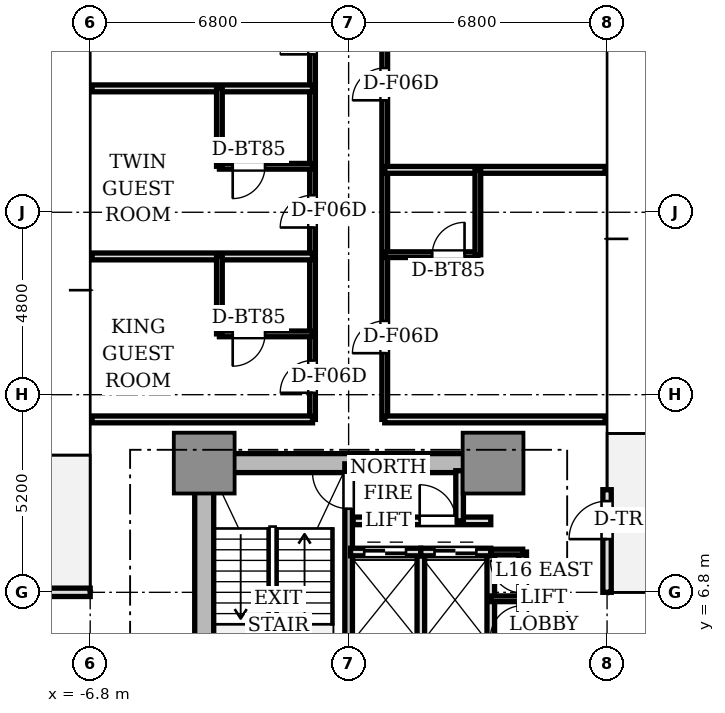
"""IFC4 building model, lengths in metres.
Left out: names, types, materials, properties, quantities, classifications, styles, units other than length and angle.
Written with IfcOpenShell. Run it as: python <this file> out.ifc"""

import sys

from ifc_helpers import new_model, si_unit, direction, frame, frame_2d, origin, origin_2d, place, context, subcontext, project, spatial, rectangle, extrude, source, transform, mapped, element, fill, save


model = new_model("IFC4")
c1 = context("Model", 3, precision=1e-05, world=origin(), true_north=direction((0.0, 1.0)))
c2 = subcontext(c1, "Body", "Model", "MODEL_VIEW")
j1 = project(units=[si_unit("LENGTHUNIT", "METRE"), si_unit("PLANEANGLEUNIT", "RADIAN")], contexts=[c1])
p1 = place(None, origin())
s1 = spatial("IfcSite", under=j1, at=p1, CompositionType="ELEMENT")
p2 = place(p1, origin())
s2 = spatial("IfcBuilding", under=s1, at=p2, CompositionType="ELEMENT")
p3 = place(p2, frame((0.0, 0.0, 61.1)))
s3 = spatial("IfcBuildingStorey", under=s2, at=p3, CompositionType="ELEMENT", Elevation=61.1)
p4 = place(p3, frame((-3.55, 10.2, 0.0), z_axis=(0.0, 0.0, 1.0), x_axis=(1.0, 0.0, 0.0)))
e1 = element("IfcWall", 1, at=p4, inside=s3, PredefinedType="SHEAR", context=c2, shape_type="SweptSolid", body=[
    extrude(rectangle(XDim=7.1, YDim=0.5, at=frame_2d((3.55, 0.0))), origin(), (0.0, 0.0, 1.0), 3.11),
])
p5 = place(p3, frame((-3.8, 2.85, 0.0), z_axis=(0.0, 0.0, 1.0), x_axis=(0.0, 1.0, 0.0)))
e2 = element("IfcWall", 2, at=p5, inside=s3, PredefinedType="SHEAR", context=c2, shape_type="SweptSolid", body=[
    extrude(rectangle(XDim=6.9, YDim=0.5, at=frame_2d((3.45, 0.0))), origin(), (0.0, 0.0, 1.0), 3.11),
])
m1 = source(origin(), c2, "Body", "SweptSolid", [
    extrude(rectangle(XDim=1.6, YDim=1.6, at=origin_2d()), origin(), (0.0, 0.0, 1.0), 3.11),
])
for number, where, z_axis, x_axis in (
    (3, (-3.8, 10.2, 0.0), (0.0, 0.0, 1.0), (1.0, 0.0, 0.0)),
    (4, (3.8, 10.2, 0.0), (0.0, 0.0, 1.0), (1.0, 0.0, 0.0)),
):
    element("IfcColumn", number, at=place(p3, frame(where, z_axis=z_axis, x_axis=x_axis)), inside=s3, PredefinedType="COLUMN", context=c2, shape_type="MappedRepresentation", body=[
        mapped(m1, transform((0.0, 0.0, 0.0), scale=1.0)),
    ])
p6 = place(p3, frame((6.8, 6.8, 0.0), z_axis=(0.0, 0.0, 1.0), x_axis=(0.0, 1.0, 0.0)))
e5 = element("IfcWall", 5, at=p6, inside=s3, PredefinedType="STANDARD", context=c2, shape_type="SweptSolid", body=[
    extrude(rectangle(XDim=2.7, YDim=0.22, at=frame_2d((1.35, 0.0))), origin(), (0.0, 0.0, 1.0), 3.11),
])
p7 = place(p6, frame((1.4, 0.0, 0.0)))
e6 = element("IfcOpeningElement", 6, at=p7, cuts=e5, PredefinedType="OPENING", context=c2, shape_type="SweptSolid", body=[
    extrude(rectangle(XDim=1.0, YDim=2.2, at=frame_2d((0.5, 1.1))), frame((0.0, 0.12, 0.0), z_axis=(0.0, -1.0, 0.0), x_axis=(1.0, 0.0, 0.0)), (0.0, 0.0, 1.0), 0.24),
])
p8 = place(p3, frame((-6.8, 6.8, 0.0), z_axis=(0.0, 0.0, 1.0), x_axis=(-1.0, 0.0, 0.0)))
e7 = element("IfcWall", 7, at=p8, inside=s3, PredefinedType="STANDARD", context=c2, shape_type="SweptSolid", body=[
    extrude(rectangle(XDim=2.7, YDim=0.22, at=frame_2d((1.35, 0.0))), origin(), (0.0, 0.0, 1.0), 3.11),
])
p9 = place(p8, frame((1.4, 0.0, 0.0)))
e8 = element("IfcOpeningElement", 8, at=p9, cuts=e7, PredefinedType="OPENING", context=c2, shape_type="SweptSolid", body=[
    extrude(rectangle(XDim=1.0, YDim=2.2, at=frame_2d((0.5, 1.1))), frame((0.0, 0.12, 0.0), z_axis=(0.0, -1.0, 0.0), x_axis=(1.0, 0.0, 0.0)), (0.0, 0.0, 1.0), 0.24),
])
p10 = place(p3, frame((0.0, 2.5, 0.0), z_axis=(0.0, 0.0, 1.0), x_axis=(0.0, 1.0, 0.0)))
e9 = element("IfcWall", 9, at=p10, inside=s3, PredefinedType="SOLIDWALL", context=c2, shape_type="SweptSolid", body=[
    extrude(rectangle(XDim=7.68, YDim=0.2, at=frame_2d((3.84, 0.0))), origin(), (0.0, 0.0, 1.0), 3.11),
])
p11 = place(p10, frame((6.5, 0.0, 0.0)))
e10 = element("IfcOpeningElement", 10, at=p11, cuts=e9, PredefinedType="OPENING", context=c2, shape_type="SweptSolid", body=[
    extrude(rectangle(XDim=0.95, YDim=2.15, at=frame_2d((0.475, 1.075))), frame((0.0, 0.11, 0.0), z_axis=(0.0, -1.0, 0.0), x_axis=(1.0, 0.0, 0.0)), (0.0, 0.0, 1.0), 0.22),
])
p12 = place(p3, frame((1.9, 5.38, 0.0), z_axis=(0.0, 0.0, 1.0), x_axis=(0.0, 1.0, 0.0)))
e11 = element("IfcWall", 11, at=p12, inside=s3, PredefinedType="SOLIDWALL", context=c2, shape_type="SweptSolid", body=[
    extrude(rectangle(XDim=2.48, YDim=0.2, at=frame_2d((1.24, 0.0))), origin(), (0.0, 0.0, 1.0), 2.66),
])
p13 = place(p3, frame((0.05, 7.86, 0.0), z_axis=(0.0, 0.0, 1.0), x_axis=(1.0, 0.0, 0.0)))
e12 = element("IfcWall", 12, at=p13, inside=s3, PredefinedType="SOLIDWALL", context=c2, shape_type="SweptSolid", body=[
    extrude(rectangle(XDim=1.85, YDim=0.2, at=frame_2d((0.925, 0.0))), origin(), (0.0, 0.0, 1.0), 2.66),
])
p14 = place(p13, frame((0.36, 0.0, 0.0)))
e13 = element("IfcOpeningElement", 13, at=p14, cuts=e12, PredefinedType="OPENING", context=c2, shape_type="SweptSolid", body=[
    extrude(rectangle(XDim=1.1, YDim=2.2, at=frame_2d((0.55, 1.1))), frame((0.0, 0.11, 0.0), z_axis=(0.0, -1.0, 0.0), x_axis=(1.0, 0.0, 0.0)), (0.0, 0.0, 1.0), 0.22),
])
p15 = place(p3, frame((3.74, 5.38, 0.0), z_axis=(0.0, 0.0, 1.0), x_axis=(0.0, 1.0, 0.0)))
e14 = element("IfcWall", 14, at=p15, inside=s3, PredefinedType="SOLIDWALL", context=c2, shape_type="SweptSolid", body=[
    extrude(rectangle(XDim=2.48, YDim=0.2, at=frame_2d((1.24, 0.0))), origin(), (0.0, 0.0, 1.0), 2.66),
])
p16 = place(p3, frame((1.9, 7.86, 0.0), z_axis=(0.0, 0.0, 1.0), x_axis=(1.0, 0.0, 0.0)))
e15 = element("IfcWall", 15, at=p16, inside=s3, PredefinedType="SOLIDWALL", context=c2, shape_type="SweptSolid", body=[
    extrude(rectangle(XDim=1.84, YDim=0.2, at=frame_2d((0.92, 0.0))), origin(), (0.0, 0.0, 1.0), 2.66),
])
p17 = place(p16, frame((0.36, 0.0, 0.0)))
e16 = element("IfcOpeningElement", 16, at=p17, cuts=e15, PredefinedType="OPENING", context=c2, shape_type="SweptSolid", body=[
    extrude(rectangle(XDim=1.1, YDim=2.2, at=frame_2d((0.55, 1.1))), frame((0.0, 0.11, 0.0), z_axis=(0.0, -1.0, 0.0), x_axis=(1.0, 0.0, 0.0)), (0.0, 0.0, 1.0), 0.22),
])
p18 = place(p3, frame((0.12, 8.68, 0.0), z_axis=(0.0, 0.0, 1.0), x_axis=(1.0, 0.0, 0.0)))
e17 = element("IfcWall", 17, at=p18, inside=s3, PredefinedType="SOLIDWALL", context=c2, shape_type="SweptSolid", body=[
    extrude(rectangle(XDim=3.62, YDim=0.2, at=frame_2d((1.81, 0.0))), origin(), (0.0, 0.0, 1.0), 2.66),
])
p19 = place(p18, frame((1.75, 0.0, 0.0)))
e18 = element("IfcOpeningElement", 18, at=p19, cuts=e17, PredefinedType="OPENING", context=c2, shape_type="SweptSolid", body=[
    extrude(rectangle(XDim=0.95, YDim=2.15, at=frame_2d((0.475, 1.075))), frame((0.0, 0.11, 0.0), z_axis=(0.0, -1.0, 0.0), x_axis=(1.0, 0.0, 0.0)), (0.0, 0.0, 1.0), 0.22),
])
p20 = place(p3, frame((2.92, 8.68, 0.0), z_axis=(0.0, 0.0, 1.0), x_axis=(0.0, 1.0, 0.0)))
e19 = element("IfcWall", 19, at=p20, inside=s3, PredefinedType="SOLIDWALL", context=c2, shape_type="SweptSolid", body=[
    extrude(rectangle(XDim=1.32, YDim=0.2, at=frame_2d((0.66, 0.0))), origin(), (0.0, 0.0, 1.0), 2.66),
])
p21 = place(p3, frame((4.58, 5.4, 0.0), z_axis=(0.0, 0.0, 1.0), x_axis=(0.0, 1.0, 0.0)))
e20 = element("IfcWall", 20, at=p21, inside=s3, PredefinedType="SOLIDWALL", context=c2, shape_type="SweptSolid", body=[
    extrude(rectangle(XDim=2.46, YDim=0.2, at=frame_2d((1.23, 0.0))), origin(), (0.0, 0.0, 1.0), 2.66),
])
p22 = place(p21, frame((0.2, 0.0, 0.0)))
e21 = element("IfcOpeningElement", 21, at=p22, cuts=e20, PredefinedType="OPENING", context=c2, shape_type="SweptSolid", body=[
    extrude(rectangle(XDim=0.85, YDim=2.1, at=frame_2d((0.425, 1.05))), frame((0.0, 0.11, 0.0), z_axis=(0.0, -1.0, 0.0), x_axis=(1.0, 0.0, 0.0)), (0.0, 0.0, 1.0), 0.22),
])
p23 = place(p21, frame((1.38, 0.0, 0.0)))
e22 = element("IfcOpeningElement", 22, at=p23, cuts=e20, PredefinedType="OPENING", context=c2, shape_type="SweptSolid", body=[
    extrude(rectangle(XDim=0.85, YDim=2.1, at=frame_2d((0.425, 1.05))), frame((0.0, 0.11, 0.0), z_axis=(0.0, -1.0, 0.0), x_axis=(1.0, 0.0, 0.0)), (0.0, 0.0, 1.0), 0.22),
])
for number, where, z_axis, x_axis in (
    (23, (3.74, 7.86, 0.0), (0.0, 0.0, 1.0), (1.0, 0.0, 0.0)),
    (24, (3.74, 6.63, 0.0), (0.0, 0.0, 1.0), (1.0, 0.0, 0.0)),
):
    element("IfcWall", number, at=place(p3, frame(where, z_axis=z_axis, x_axis=x_axis)), inside=s3, PredefinedType="PARTITIONING", context=c2, shape_type="SweptSolid", body=[
        extrude(rectangle(XDim=0.84, YDim=0.15, at=frame_2d((0.42, 0.0))), origin(), (0.0, 0.0, 1.0), 2.66),
    ])
p24 = place(p3, frame((-0.95, 11.35, 0.0), z_axis=(0.0, 0.0, 1.0), x_axis=(0.0, 1.0, 0.0)))
e25 = element("IfcWall", 25, at=p24, inside=s3, PredefinedType="PARTITIONING", context=c2, shape_type="SweptSolid", body=[
    extrude(rectangle(XDim=13.4, YDim=0.15, at=frame_2d((6.7, 0.0))), origin(), (0.0, 0.0, 1.0), 2.66),
])
p25 = place(p24, frame((0.7, 0.0, 0.0)))
e26 = element("IfcOpeningElement", 26, at=p25, cuts=e25, PredefinedType="OPENING", context=c2, shape_type="SweptSolid", body=[
    extrude(rectangle(XDim=0.85, YDim=2.1, at=frame_2d((0.425, 1.05))), frame((0.0, 0.085, 0.0), z_axis=(0.0, -1.0, 0.0), x_axis=(1.0, 0.0, 0.0)), (0.0, 0.0, 1.0), 0.17),
])
p26 = place(p24, frame((5.049, 0.0, 0.0)))
e27 = element("IfcOpeningElement", 27, at=p26, cuts=e25, PredefinedType="OPENING", context=c2, shape_type="SweptSolid", body=[
    extrude(rectangle(XDim=0.85, YDim=2.1, at=frame_2d((0.425, 1.05))), frame((0.0, 0.085, 0.0), z_axis=(0.0, -1.0, 0.0), x_axis=(1.0, 0.0, 0.0)), (0.0, 0.0, 1.0), 0.17),
])
p27 = place(p24, frame((9.605, 0.0, 0.0)))
e28 = element("IfcOpeningElement", 28, at=p27, cuts=e25, PredefinedType="OPENING", context=c2, shape_type="SweptSolid", body=[
    extrude(rectangle(XDim=0.85, YDim=2.1, at=frame_2d((0.425, 1.05))), frame((0.0, 0.085, 0.0), z_axis=(0.0, -1.0, 0.0), x_axis=(1.0, 0.0, 0.0)), (0.0, 0.0, 1.0), 0.17),
])
p28 = place(p3, frame((0.95, 11.35, 0.0), z_axis=(0.0, 0.0, 1.0), x_axis=(0.0, 1.0, 0.0)))
e29 = element("IfcWall", 29, at=p28, inside=s3, PredefinedType="PARTITIONING", context=c2, shape_type="SweptSolid", body=[
    extrude(rectangle(XDim=13.4, YDim=0.15, at=frame_2d((6.7, 0.0))), origin(), (0.0, 0.0, 1.0), 2.66),
])
p29 = place(p28, frame((1.742, 0.0, 0.0)))
e30 = element("IfcOpeningElement", 30, at=p29, cuts=e29, PredefinedType="OPENING", context=c2, shape_type="SweptSolid", body=[
    extrude(rectangle(XDim=0.85, YDim=2.1, at=frame_2d((0.425, 1.05))), frame((0.0, 0.085, 0.0), z_axis=(0.0, -1.0, 0.0), x_axis=(1.0, 0.0, 0.0)), (0.0, 0.0, 1.0), 0.17),
])
p30 = place(p28, frame((8.396, 0.0, 0.0)))
e31 = element("IfcOpeningElement", 31, at=p30, cuts=e29, PredefinedType="OPENING", context=c2, shape_type="SweptSolid", body=[
    extrude(rectangle(XDim=0.85, YDim=2.1, at=frame_2d((0.425, 1.05))), frame((0.0, 0.085, 0.0), z_axis=(0.0, -1.0, 0.0), x_axis=(1.0, 0.0, 0.0)), (0.0, 0.0, 1.0), 0.17),
])
for number, where, z_axis, x_axis in (
    (32, (-0.95, 11.35, 0.0), (0.0, 0.0, 1.0), (-1.0, 0.0, 0.0)),
    (33, (6.75, 11.35, 0.0), (0.0, 0.0, 1.0), (-1.0, 0.0, 0.0)),
    (34, (-0.95, 15.638, 0.0), (0.0, 0.0, 1.0), (-1.0, 0.0, 0.0)),
):
    element("IfcWall", number, at=place(p3, frame(where, z_axis=z_axis, x_axis=x_axis)), inside=s3, PredefinedType="PARTITIONING", context=c2, shape_type="SweptSolid", body=[
        extrude(rectangle(XDim=5.8, YDim=0.18, at=frame_2d((2.9, 0.0))), origin(), (0.0, 0.0, 1.0), 2.66),
    ])
p31 = place(p3, frame((-0.95, 13.6, 0.0), z_axis=(0.0, 0.0, 1.0), x_axis=(-1.0, 0.0, 0.0)))
e35 = element("IfcWall", 35, at=p31, inside=s3, PredefinedType="PARTITIONING", context=c2, shape_type="SweptSolid", body=[
    extrude(rectangle(XDim=2.45, YDim=0.15, at=frame_2d((1.225, 0.0))), origin(), (0.0, 0.0, 1.0), 2.66),
])
p32 = place(p31, frame((1.25, 0.0, 0.0)))
e36 = element("IfcOpeningElement", 36, at=p32, cuts=e35, PredefinedType="OPENING", context=c2, shape_type="SweptSolid", body=[
    extrude(rectangle(XDim=0.85, YDim=2.1, at=frame_2d((0.425, 1.05))), frame((0.0, 0.085, 0.0), z_axis=(0.0, -1.0, 0.0), x_axis=(1.0, 0.0, 0.0)), (0.0, 0.0, 1.0), 0.17),
])
p33 = place(p3, frame((-3.4, 13.6, 0.0), z_axis=(0.0, 0.0, 1.0), x_axis=(0.0, 1.0, 0.0)))
e37 = element("IfcWall", 37, at=p33, inside=s3, PredefinedType="PARTITIONING", context=c2, shape_type="SweptSolid", body=[
    extrude(rectangle(XDim=2.038, YDim=0.15, at=frame_2d((1.019, 0.0))), origin(), (0.0, 0.0, 1.0), 2.66),
])
p34 = place(p3, frame((-0.95, 20.06, 0.0), z_axis=(0.0, 0.0, 1.0), x_axis=(-1.0, 0.0, 0.0)))
e38 = element("IfcWall", 38, at=p34, inside=s3, PredefinedType="PARTITIONING", context=c2, shape_type="SweptSolid", body=[
    extrude(rectangle(XDim=5.8, YDim=0.18, at=frame_2d((2.9, 0.0))), origin(), (0.0, 0.0, 1.0), 2.66),
])
p35 = place(p3, frame((-0.95, 18.01, 0.0), z_axis=(0.0, 0.0, 1.0), x_axis=(-1.0, 0.0, 0.0)))
e39 = element("IfcWall", 39, at=p35, inside=s3, PredefinedType="PARTITIONING", context=c2, shape_type="SweptSolid", body=[
    extrude(rectangle(XDim=2.45, YDim=0.15, at=frame_2d((1.225, 0.0))), origin(), (0.0, 0.0, 1.0), 2.66),
])
p36 = place(p35, frame((1.25, 0.0, 0.0)))
e40 = element("IfcOpeningElement", 40, at=p36, cuts=e39, PredefinedType="OPENING", context=c2, shape_type="SweptSolid", body=[
    extrude(rectangle(XDim=0.85, YDim=2.1, at=frame_2d((0.425, 1.05))), frame((0.0, 0.085, 0.0), z_axis=(0.0, -1.0, 0.0), x_axis=(1.0, 0.0, 0.0)), (0.0, 0.0, 1.0), 0.17),
])
p37 = place(p3, frame((-3.4, 18.01, 0.0), z_axis=(0.0, 0.0, 1.0), x_axis=(0.0, 1.0, 0.0)))
e41 = element("IfcWall", 41, at=p37, inside=s3, PredefinedType="PARTITIONING", context=c2, shape_type="SweptSolid", body=[
    extrude(rectangle(XDim=2.05, YDim=0.15, at=frame_2d((1.025, 0.0))), origin(), (0.0, 0.0, 1.0), 2.66),
])
p38 = place(p3, frame((0.95, 17.916, 0.0), z_axis=(0.0, 0.0, 1.0), x_axis=(1.0, 0.0, 0.0)))
e42 = element("IfcWall", 42, at=p38, inside=s3, PredefinedType="PARTITIONING", context=c2, shape_type="SweptSolid", body=[
    extrude(rectangle(XDim=5.8, YDim=0.18, at=frame_2d((2.9, 0.0))), origin(), (0.0, 0.0, 1.0), 2.66),
])
p39 = place(p3, frame((0.95, 15.684, 0.0), z_axis=(0.0, 0.0, 1.0), x_axis=(1.0, 0.0, 0.0)))
e43 = element("IfcWall", 43, at=p39, inside=s3, PredefinedType="PARTITIONING", context=c2, shape_type="SweptSolid", body=[
    extrude(rectangle(XDim=2.45, YDim=0.15, at=frame_2d((1.225, 0.0))), origin(), (0.0, 0.0, 1.0), 2.66),
])
p40 = place(p39, frame((1.25, 0.0, 0.0)))
e44 = element("IfcOpeningElement", 44, at=p40, cuts=e43, PredefinedType="OPENING", context=c2, shape_type="SweptSolid", body=[
    extrude(rectangle(XDim=0.85, YDim=2.1, at=frame_2d((0.425, 1.05))), frame((0.0, 0.085, 0.0), z_axis=(0.0, -1.0, 0.0), x_axis=(1.0, 0.0, 0.0)), (0.0, 0.0, 1.0), 0.17),
])
p41 = place(p3, frame((3.4, 15.684, 0.0), z_axis=(0.0, 0.0, 1.0), x_axis=(0.0, 1.0, 0.0)))
e45 = element("IfcWall", 45, at=p41, inside=s3, PredefinedType="PARTITIONING", context=c2, shape_type="SweptSolid", body=[
    extrude(rectangle(XDim=2.232, YDim=0.15, at=frame_2d((1.116, 0.0))), origin(), (0.0, 0.0, 1.0), 2.66),
])
m2 = source(origin(), c2, "Body", "SweptSolid", [
    extrude(rectangle(XDim=1.0, YDim=0.05, at=origin_2d()), origin(), (0.0, 0.0, 1.0), 2.2),
])
p42 = place(p7, frame((0.5, 0.0, 0.0)))
e46 = element("IfcDoor", 46, at=p42, inside=s3, OperationType="SINGLE_SWING_LEFT", PredefinedType="DOOR", context=c2, shape_type="MappedRepresentation", body=[
    mapped(m2, transform((0.0, 0.0, 0.0), scale=1.0)),
])
fill(e6, e46)
m3 = source(origin(), c2, "Body", "SweptSolid", [
    extrude(rectangle(XDim=1.1, YDim=0.05, at=origin_2d()), origin(), (0.0, 0.0, 1.0), 2.2),
])
p43 = place(p14, frame((0.55, 0.0, 0.0)))
e47 = element("IfcDoor", 47, at=p43, inside=s3, OperationType="DOUBLE_DOOR_SLIDING", PredefinedType="DOOR", context=c2, shape_type="MappedRepresentation", body=[
    mapped(m3, transform((0.0, 0.0, 0.0), scale=1.0)),
])
fill(e13, e47)
p44 = place(p17, frame((0.55, 0.0, 0.0)))
e48 = element("IfcDoor", 48, at=p44, inside=s3, OperationType="DOUBLE_DOOR_SLIDING", PredefinedType="DOOR", context=c2, shape_type="MappedRepresentation", body=[
    mapped(m3, transform((0.0, 0.0, 0.0), scale=1.0)),
])
fill(e16, e48)
m4 = source(origin(), c2, "Body", "SweptSolid", [
    extrude(rectangle(XDim=0.95, YDim=0.05, at=origin_2d()), origin(), (0.0, 0.0, 1.0), 2.15),
])
p45 = place(p11, frame((0.475, 0.0, 0.0)))
e49 = element("IfcDoor", 49, at=p45, inside=s3, OperationType="SINGLE_SWING_RIGHT", PredefinedType="DOOR", context=c2, shape_type="MappedRepresentation", body=[
    mapped(m4, transform((0.0, 0.0, 0.0), scale=1.0)),
])
fill(e10, e49)
p46 = place(p19, frame((0.475, 0.0, 0.0)))
e50 = element("IfcDoor", 50, at=p46, inside=s3, OperationType="SINGLE_SWING_LEFT", PredefinedType="DOOR", context=c2, shape_type="MappedRepresentation", body=[
    mapped(m4, transform((0.0, 0.0, 0.0), scale=1.0)),
])
fill(e18, e50)
m5 = source(origin(), c2, "Body", "SweptSolid", [
    extrude(rectangle(XDim=0.85, YDim=0.05, at=origin_2d()), origin(), (0.0, 0.0, 1.0), 2.1),
])
p47 = place(p22, frame((0.425, 0.0, 0.0)))
e51 = element("IfcDoor", 51, at=p47, inside=s3, OperationType="SINGLE_SWING_LEFT", PredefinedType="DOOR", context=c2, shape_type="MappedRepresentation", body=[
    mapped(m5, transform((0.0, 0.0, 0.0), scale=1.0)),
])
fill(e21, e51)
p48 = place(p23, frame((0.425, 0.0, 0.0)))
e52 = element("IfcDoor", 52, at=p48, inside=s3, OperationType="SINGLE_SWING_RIGHT", PredefinedType="DOOR", context=c2, shape_type="MappedRepresentation", body=[
    mapped(m5, transform((0.0, 0.0, 0.0), scale=1.0)),
])
fill(e22, e52)
p49 = place(p32, frame((0.425, 0.0, 0.0)))
e53 = element("IfcDoor", 53, at=p49, inside=s3, OperationType="SINGLE_SWING_RIGHT", PredefinedType="DOOR", context=c2, shape_type="MappedRepresentation", body=[
    mapped(m5, transform((0.0, 0.0, 0.0), scale=1.0)),
])
fill(e36, e53)
p50 = place(p25, frame((0.425, 0.0, 0.0)))
e54 = element("IfcDoor", 54, at=p50, inside=s3, OperationType="SINGLE_SWING_LEFT", PredefinedType="DOOR", context=c2, shape_type="MappedRepresentation", body=[
    mapped(m5, transform((0.0, 0.0, 0.0), scale=1.0)),
])
fill(e26, e54)
p51 = place(p36, frame((0.425, 0.0, 0.0)))
e55 = element("IfcDoor", 55, at=p51, inside=s3, OperationType="SINGLE_SWING_RIGHT", PredefinedType="DOOR", context=c2, shape_type="MappedRepresentation", body=[
    mapped(m5, transform((0.0, 0.0, 0.0), scale=1.0)),
])
fill(e40, e55)
p52 = place(p26, frame((0.425, 0.0, 0.0)))
e56 = element("IfcDoor", 56, at=p52, inside=s3, OperationType="SINGLE_SWING_LEFT", PredefinedType="DOOR", context=c2, shape_type="MappedRepresentation", body=[
    mapped(m5, transform((0.0, 0.0, 0.0), scale=1.0)),
])
fill(e27, e56)
p53 = place(p27, frame((0.425, 0.0, 0.0)))
e57 = element("IfcDoor", 57, at=p53, inside=s3, OperationType="SINGLE_SWING_LEFT", PredefinedType="DOOR", context=c2, shape_type="MappedRepresentation", body=[
    mapped(m5, transform((0.0, 0.0, 0.0), scale=1.0)),
])
fill(e28, e57)
p54 = place(p40, frame((0.425, 0.0, 0.0)))
e58 = element("IfcDoor", 58, at=p54, inside=s3, OperationType="SINGLE_SWING_RIGHT", PredefinedType="DOOR", context=c2, shape_type="MappedRepresentation", body=[
    mapped(m5, transform((0.0, 0.0, 0.0), scale=1.0)),
])
fill(e44, e58)
p55 = place(p29, frame((0.425, 0.0, 0.0)))
e59 = element("IfcDoor", 59, at=p55, inside=s3, OperationType="SINGLE_SWING_LEFT", PredefinedType="DOOR", context=c2, shape_type="MappedRepresentation", body=[
    mapped(m5, transform((0.0, 0.0, 0.0), scale=1.0)),
])
fill(e30, e59)
p56 = place(p30, frame((0.425, 0.0, 0.0)))
e60 = element("IfcDoor", 60, at=p56, inside=s3, OperationType="SINGLE_SWING_LEFT", PredefinedType="DOOR", context=c2, shape_type="MappedRepresentation", body=[
    mapped(m5, transform((0.0, 0.0, 0.0), scale=1.0)),
])
fill(e31, e60)
save(model, sys.argv[1])
